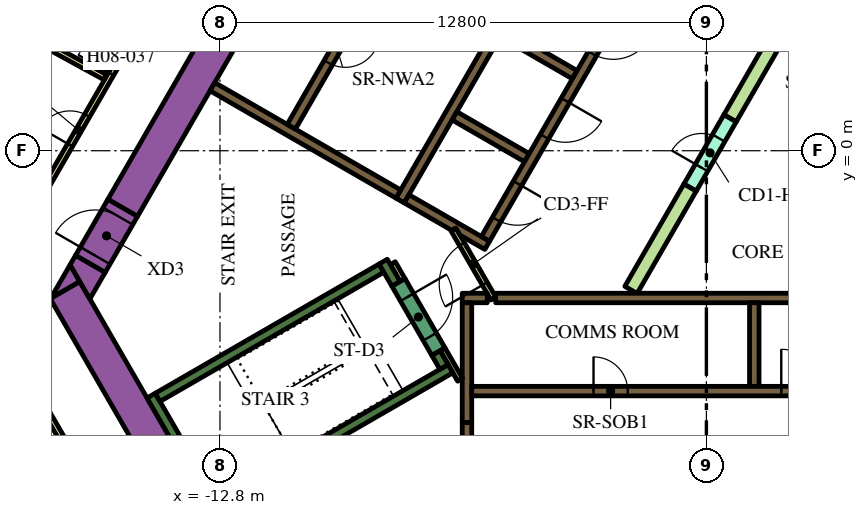
"""IFC4 building model, lengths in metres.
Left out: names, types, materials, properties, quantities, classifications, styles, units other than length and angle.
Written with IfcOpenShell. Run it as: python <this file> out.ifc"""

import sys

from ifc_helpers import new_model, si_unit, direction, frame, frame_2d, origin, place, context, subcontext, project, spatial, polyline, rectangle, outline, extrude, element, fill, save


model = new_model("IFC4")
c1 = context("Model", 3, precision=1e-05, world=origin(), true_north=direction((0.0, 1.0)))
c2 = subcontext(c1, "Body", "Model", "MODEL_VIEW")
j1 = project(units=[si_unit("LENGTHUNIT", "METRE"), si_unit("PLANEANGLEUNIT", "RADIAN")], contexts=[c1])
p1 = place(None, origin())
s1 = spatial("IfcSite", under=j1, at=p1, CompositionType="ELEMENT")
p2 = place(p1, origin())
s2 = spatial("IfcBuilding", under=s1, at=p2, CompositionType="ELEMENT")
p3 = place(p2, frame((0.0, 0.0, 111.0)))
s3 = spatial("IfcBuildingStorey", under=s2, at=p3, CompositionType="ELEMENT", Elevation=111.0)
p4 = place(p3, frame((-15.36, -1.503, 0.0), z_axis=(0.0, 0.0, 1.0), x_axis=(0.50000389221, 0.866023156604, 0.0)))
e1 = element("IfcWall", 1, at=p4, inside=s3, PredefinedType="SOLIDWALL", context=c2, shape_type="SweptSolid", body=[
    extrude(rectangle(XDim=21.0, YDim=0.9, at=frame_2d((10.5, 0.0))), origin(), (0.0, 0.0, 1.0), 3.9),
])
p5 = place(p3, frame((-12.134, -11.883, 0.0), z_axis=(0.0, 0.0, 1.0), x_axis=(-0.500005339912, 0.866022320763, 0.0)))
e2 = element("IfcWall", 2, at=p5, inside=s3, PredefinedType="SOLIDWALL", context=c2, shape_type="SweptSolid", body=[
    extrude(rectangle(XDim=9.488, YDim=0.9, at=frame_2d((4.744, 0.0))), origin(), (0.0, 0.0, 1.0), 3.9),
])
p6 = place(p3, origin())
e3 = element("IfcWall", 3, at=p6, inside=s3, PredefinedType="SOLIDWALL", context=c2, shape_type="SweptSolid", body=[
    extrude(outline(polyline([(-16.489, -3.44), (-17.251, -3.88), (-16.743, -3.0), (-16.489, -3.44)])), origin(), (0.0, 0.0, 1.0), 3.9),
])
e4 = element("IfcWall", 4, at=p6, inside=s3, PredefinedType="SOLIDWALL", context=c2, shape_type="SweptSolid", body=[
    extrude(outline(polyline([(-15.82, -3.201), (-16.223, -3.9), (-16.743, -3.0), (-16.599, -2.751), (-15.82, -3.201)])), origin(), (0.0, 0.0, 1.0), 3.9),
])
p7 = place(p3, frame((-12.885, -9.431, 0.0), z_axis=(0.0, 0.0, 1.0), x_axis=(-0.500020560727, 0.866013532718, 0.0)))
e5 = element("IfcWall", 5, at=p7, inside=s3, PredefinedType="SOLIDWALL", context=c2, shape_type="SweptSolid", body=[
    extrude(rectangle(XDim=3.45, YDim=0.25, at=frame_2d((1.725, 0.0))), origin(), (0.0, 0.0, 1.0), 3.9),
])
p8 = place(p3, frame((-14.44, -6.49, 0.0), z_axis=(0.0, 0.0, 1.0), x_axis=(0.866022966069, 0.500004222222, 0.0)))
e6 = element("IfcWall", 6, at=p8, inside=s3, PredefinedType="SOLIDWALL", context=c2, shape_type="SweptSolid", body=[
    extrude(rectangle(XDim=6.8, YDim=0.25, at=frame_2d((3.4, 0.0))), origin(), (0.0, 0.0, 1.0), 3.9),
])
p9 = place(p3, frame((-8.168, -3.503, 0.0), z_axis=(0.0, 0.0, 1.0), x_axis=(-0.499952099219, 0.866053057547, 0.0)))
e7 = element("IfcWall", 7, at=p9, inside=s3, PredefinedType="SOLIDWALL", context=c2, shape_type="SweptSolid", body=[
    extrude(rectangle(XDim=0.675, YDim=0.25, at=frame_2d((0.337, 0.0))), origin(), (0.0, 0.0, 1.0), 3.9),
])
p10 = place(p3, frame((-12.84, -9.261, 0.0), z_axis=(0.0, 0.0, 1.0), x_axis=(0.866016039709, 0.500016218704, 0.0)))
e8 = element("IfcWall", 8, at=p10, inside=s3, PredefinedType="SOLIDWALL", context=c2, shape_type="SweptSolid", body=[
    extrude(rectangle(XDim=7.05, YDim=0.25, at=frame_2d((3.525, 0.0))), origin(), (0.0, 0.0, 1.0), 3.9),
])
p11 = place(p3, frame((-6.905, -5.69, 0.0), z_axis=(0.0, 0.0, 1.0), x_axis=(-0.500402024738, 0.865793170242, 0.0)))
e9 = element("IfcWall", 9, at=p11, inside=s3, PredefinedType="SOLIDWALL", context=c2, shape_type="SweptSolid", body=[
    extrude(rectangle(XDim=0.425, YDim=0.25, at=frame_2d((0.212, 0.0))), origin(), (0.0, 0.0, 1.0), 3.9),
])
p12 = place(p3, frame((-5.545, -3.875, 0.0), z_axis=(0.0, 0.0, 1.0), x_axis=(1.0, 0.0, 0.0)))
e10 = element("IfcWall", 10, at=p12, inside=s3, PredefinedType="SOLIDWALL", context=c2, shape_type="SweptSolid", body=[
    extrude(rectangle(XDim=11.97, YDim=0.25, at=frame_2d((5.985, 0.0))), origin(), (0.0, 0.0, 1.0), 3.9),
])
p13 = place(p3, frame((-6.425, -3.875, 0.0), z_axis=(0.0, 0.0, 1.0), x_axis=(1.0, 0.0, 0.0)))
e11 = element("IfcWall", 11, at=p13, inside=s3, PredefinedType="SOLIDWALL", context=c2, shape_type="SweptSolid", body=[
    extrude(rectangle(XDim=0.658, YDim=0.25, at=frame_2d((0.329, 0.0))), origin(), (0.0, 0.0, 1.0), 3.9),
])
p14 = place(p3, frame((1.26, -4.0, 0.0), z_axis=(0.0, 0.0, 1.0), x_axis=(0.0, -1.0, 0.0)))
e12 = element("IfcWall", 12, at=p14, inside=s3, PredefinedType="SOLIDWALL", context=c2, shape_type="SweptSolid", body=[
    extrude(rectangle(XDim=2.2, YDim=0.25, at=frame_2d((1.1, 0.0))), origin(), (0.0, 0.0, 1.0), 3.9),
])
p15 = place(p3, frame((-6.3, -4.0, 0.0), z_axis=(0.0, 0.0, 1.0), x_axis=(0.0, -1.0, 0.0)))
e13 = element("IfcWall", 13, at=p15, inside=s3, PredefinedType="SOLIDWALL", context=c2, shape_type="SweptSolid", body=[
    extrude(rectangle(XDim=3.154, YDim=0.25, at=frame_2d((1.577, 0.0))), origin(), (0.0, 0.0, 1.0), 3.9),
])
e14 = element("IfcWall", 14, at=p6, inside=s3, PredefinedType="SOLIDWALL", context=c2, shape_type="SweptSolid", body=[
    extrude(outline(polyline([(0.566, 6.725), (0.566, 6.875), (0.566, 6.875), (0.565, 6.875), (0.361, 6.875), (0.035, 7.439), (0.252, 7.564), (0.377, 7.348), (6.552, -3.348), (6.677, -3.564), (6.46, -3.689), (0.448, 6.725), (0.565, 6.725), (0.566, 6.725), (0.566, 6.725)])), origin(), (0.0, 0.0, 1.0), 3.9),
])
p16 = place(p3, frame((-8.06, -1.311, 0.0), z_axis=(0.0, 0.0, 1.0), x_axis=(0.50000273126, 0.866023826885, 0.0)))
e15 = element("IfcWall", 15, at=p16, inside=s3, PredefinedType="SOLIDWALL", context=c2, shape_type="SweptSolid", body=[
    extrude(rectangle(XDim=10.33, YDim=0.25, at=frame_2d((5.165, 0.0))), origin(), (0.0, 0.0, 1.0), 3.9),
])
for number, where, z_axis, x_axis in (
    (16, (-5.369, 3.1, 0.0), (0.0, 0.0, 1.0), (0.866, -0.5, 0.0)),
    (17, (-4.724, -0.182, 0.0), (0.0, 0.0, 1.0), (-0.866, 0.5, 0.0)),
):
    element("IfcWall", number, at=place(p3, frame(where, z_axis=z_axis, x_axis=x_axis)), inside=s3, PredefinedType="SOLIDWALL", context=c2, shape_type="SweptSolid", body=[
        extrude(rectangle(XDim=2.2, YDim=0.25, at=frame_2d((1.1, 0.0))), origin(), (0.0, 0.0, 1.0), 3.9),
    ])
e18 = element("IfcWall", 18, at=p6, inside=s3, PredefinedType="SOLIDWALL", context=c2, shape_type="SweptSolid", body=[
    extrude(outline(polyline([(-5.922, -2.257), (-5.922, -2.257), (-5.705, -2.382), (-5.83, -2.598), (-6.483, -2.221), (-6.591, -2.033), (-6.591, -2.033), (-6.7, -2.096), (-7.952, -1.373), (-7.827, -1.156), (-5.922, -2.257)])), origin(), (0.0, 0.0, 1.0), 3.9),
])
p17 = place(p3, frame((-8.106, -1.14, 0.0), z_axis=(0.0, 0.0, 1.0), x_axis=(-0.866000643155, 0.500042884217, 0.0)))
e19 = element("IfcWall", 19, at=p17, inside=s3, PredefinedType="SOLIDWALL", context=c2, shape_type="SweptSolid", body=[
    extrude(rectangle(XDim=5.65, YDim=0.25, at=frame_2d((2.825, 0.0))), origin(), (0.0, 0.0, 1.0), 3.9),
])
p18 = place(p3, frame((-6.48, -6.027, 0.0), z_axis=(0.0, 0.0, 1.0), x_axis=(-0.499927229454, 0.866067413802, 0.0)))
e20 = element("IfcWall", 20, at=p18, inside=s3, PredefinedType="PARTITIONING", context=c2, shape_type="SweptSolid", body=[
    extrude(rectangle(XDim=0.929, YDim=0.15, at=frame_2d((0.464, 0.0))), origin(), (0.0, 0.0, 1.0), 3.9),
])
p19 = place(p3, frame((-8.252, -2.958, 0.0), z_axis=(0.0, 0.0, 1.0), x_axis=(0.500174715838, -0.865924508047, 0.0)))
e21 = element("IfcWall", 21, at=p19, inside=s3, PredefinedType="PARTITIONING", context=c2, shape_type="SweptSolid", body=[
    extrude(rectangle(XDim=0.514, YDim=0.15, at=frame_2d((0.257, 0.0))), origin(), (0.0, 0.0, 1.0), 2.75),
])
e22 = element("IfcWall", 22, at=p6, inside=s3, PredefinedType="PARTITIONING", context=c2, shape_type="SweptSolid", body=[
    extrude(outline(polyline([(-0.59, -0.872), (-0.265, -1.059), (-1.822, -3.756), (-2.147, -3.568), (-0.59, -0.872)])), origin(), (0.0, 0.0, 1.0), 2.75),
])
e23 = element("IfcWall", 23, at=p6, inside=s3, PredefinedType="PARTITIONING", context=c2, shape_type="SweptSolid", body=[
    extrude(outline(polyline([(2.017, 3.643), (2.342, 3.456), (0.785, 0.76), (0.46, 0.947), (2.017, 3.643)])), origin(), (0.0, 0.0, 1.0), 2.75),
])
p20 = place(p3, frame((-6.175, -6.325, 0.0), z_axis=(0.0, 0.0, 1.0), x_axis=(1.0, 0.0, 0.0)))
e24 = element("IfcWall", 24, at=p20, inside=s3, PredefinedType="SOLIDWALL", context=c2, shape_type="SweptSolid", body=[
    extrude(rectangle(XDim=12.35, YDim=0.25, at=frame_2d((6.175, 0.0))), origin(), (0.0, 0.0, 1.0), 3.9),
])
p21 = place(p20, frame((3.205, 0.0, 0.0)))
e25 = element("IfcOpeningElement", 25, at=p21, cuts=e24, PredefinedType="OPENING", context=c2, shape_type="SweptSolid", body=[
    extrude(rectangle(XDim=0.9, YDim=2.1, at=frame_2d((0.45, 1.05))), frame((0.0, 0.135, 0.0), z_axis=(0.0, -1.0, 0.0), x_axis=(1.0, 0.0, 0.0)), (0.0, 0.0, 1.0), 0.27),
])
p22 = place(p20, frame((8.145, 0.0, 0.0)))
e26 = element("IfcOpeningElement", 26, at=p22, cuts=e24, PredefinedType="OPENING", context=c2, shape_type="SweptSolid", body=[
    extrude(rectangle(XDim=1.1, YDim=2.1, at=frame_2d((0.55, 1.05))), frame((0.0, 0.135, 0.0), z_axis=(0.0, -1.0, 0.0), x_axis=(1.0, 0.0, 0.0)), (0.0, 0.0, 1.0), 0.27),
])
p23 = place(p20, frame((10.665, 0.0, 0.0)))
e27 = element("IfcOpeningElement", 27, at=p23, cuts=e24, PredefinedType="OPENING", context=c2, shape_type="SweptSolid", body=[
    extrude(rectangle(XDim=1.1, YDim=2.1, at=frame_2d((0.55, 1.05))), frame((0.0, 0.135, 0.0), z_axis=(0.0, -1.0, 0.0), x_axis=(1.0, 0.0, 0.0)), (0.0, 0.0, 1.0), 0.27),
])
p24 = place(p3, frame((-6.008, 9.144, 0.0), z_axis=(0.0, 0.0, 1.0), x_axis=(-0.500006956611, -0.866021387346, 0.0)))
e28 = element("IfcWall", 28, at=p24, inside=s3, PredefinedType="SOLIDWALL", context=c2, shape_type="SweptSolid", body=[
    extrude(rectangle(XDim=9.83, YDim=0.25, at=frame_2d((4.915, 0.0))), origin(), (0.0, 0.0, 1.0), 3.9),
])
p25 = place(p24, frame((6.985, 0.0, 0.0)))
e29 = element("IfcOpeningElement", 29, at=p25, cuts=e28, PredefinedType="OPENING", context=c2, shape_type="SweptSolid", body=[
    extrude(rectangle(XDim=0.9, YDim=2.1, at=frame_2d((0.45, 1.05))), frame((0.0, 0.135, 0.0), z_axis=(0.0, -1.0, 0.0), x_axis=(1.0, 0.0, 0.0)), (0.0, 0.0, 1.0), 0.27),
])
p26 = place(p3, frame((-0.898, 6.194, 0.0), z_axis=(0.0, 0.0, 1.0), x_axis=(-0.499996202215, -0.866027596426, 0.0)))
e30 = element("IfcWall", 30, at=p26, inside=s3, PredefinedType="SOLIDWALL", context=c2, shape_type="SweptSolid", body=[
    extrude(rectangle(XDim=9.83, YDim=0.25, at=frame_2d((4.915, 0.0))), origin(), (0.0, 0.0, 1.0), 3.9),
])
p27 = place(p26, frame((0.585, 0.0, 0.0)))
e31 = element("IfcOpeningElement", 31, at=p27, cuts=e30, PredefinedType="OPENING", context=c2, shape_type="SweptSolid", body=[
    extrude(rectangle(XDim=1.1, YDim=2.1, at=frame_2d((0.55, 1.05))), frame((0.0, 0.135, 0.0), z_axis=(0.0, -1.0, 0.0), x_axis=(1.0, 0.0, 0.0)), (0.0, 0.0, 1.0), 0.27),
])
p28 = place(p26, frame((3.105, 0.0, 0.0)))
e32 = element("IfcOpeningElement", 32, at=p28, cuts=e30, PredefinedType="OPENING", context=c2, shape_type="SweptSolid", body=[
    extrude(rectangle(XDim=1.1, YDim=2.1, at=frame_2d((0.55, 1.05))), frame((0.0, 0.135, 0.0), z_axis=(0.0, -1.0, 0.0), x_axis=(1.0, 0.0, 0.0)), (0.0, 0.0, 1.0), 0.27),
])
p29 = place(p26, frame((5.625, 0.0, 0.0)))
e33 = element("IfcOpeningElement", 33, at=p29, cuts=e30, PredefinedType="OPENING", context=c2, shape_type="SweptSolid", body=[
    extrude(rectangle(XDim=1.1, YDim=2.1, at=frame_2d((0.55, 1.05))), frame((0.0, 0.135, 0.0), z_axis=(0.0, -1.0, 0.0), x_axis=(1.0, 0.0, 0.0)), (0.0, 0.0, 1.0), 0.27),
])
p30 = place(p26, frame((8.145, 0.0, 0.0)))
e34 = element("IfcOpeningElement", 34, at=p30, cuts=e30, PredefinedType="OPENING", context=c2, shape_type="SweptSolid", body=[
    extrude(rectangle(XDim=1.1, YDim=2.1, at=frame_2d((0.55, 1.05))), frame((0.0, 0.135, 0.0), z_axis=(0.0, -1.0, 0.0), x_axis=(1.0, 0.0, 0.0)), (0.0, 0.0, 1.0), 0.27),
])
p31 = place(p3, frame((-8.103, -3.466, 0.0), z_axis=(0.0, 0.0, 1.0), x_axis=(0.500078061341, -0.865980330357, 0.0)))
e35 = element("IfcWall", 35, at=p31, inside=s3, PredefinedType="SOLIDWALL", context=c2, shape_type="SweptSolid", body=[
    extrude(rectangle(XDim=2.1, YDim=0.4, at=frame_2d((1.05, 0.0))), origin(), (0.0, 0.0, 1.0), 3.9),
])
p32 = place(p31, frame((0.45, 0.0, 0.0)))
e36 = element("IfcOpeningElement", 36, at=p32, cuts=e35, PredefinedType="OPENING", context=c2, shape_type="SweptSolid", body=[
    extrude(rectangle(XDim=1.2, YDim=2.1, at=frame_2d((0.6, 1.05))), frame((0.0, 0.21, 0.0), z_axis=(0.0, -1.0, 0.0), x_axis=(1.0, 0.0, 0.0)), (0.0, 0.0, 1.0), 0.42),
])
p33 = place(p3, frame((-6.3, -7.154, 0.0), z_axis=(0.0, 0.0, 1.0), x_axis=(0.0, -1.0, 0.0)))
e37 = element("IfcWall", 37, at=p33, inside=s3, PredefinedType="SOLIDWALL", context=c2, shape_type="SweptSolid", body=[
    extrude(rectangle(XDim=1.8, YDim=0.25, at=frame_2d((0.9, 0.0))), origin(), (0.0, 0.0, 1.0), 3.9),
])
p34 = place(p33, frame((0.45, 0.0, 0.0)))
e38 = element("IfcOpeningElement", 38, at=p34, cuts=e37, PredefinedType="OPENING", context=c2, shape_type="SweptSolid", body=[
    extrude(rectangle(XDim=0.9, YDim=2.1, at=frame_2d((0.45, 1.05))), frame((0.0, 0.135, 0.0), z_axis=(0.0, -1.0, 0.0), x_axis=(1.0, 0.0, 0.0)), (0.0, 0.0, 1.0), 0.27),
])
p35 = place(p3, frame((-0.427, -0.966, 0.0), z_axis=(0.0, 0.0, 1.0), x_axis=(0.49994051562, 0.866059744384, 0.0)))
e39 = element("IfcWall", 39, at=p35, inside=s3, PredefinedType="PARTITIONING", context=c2, shape_type="SweptSolid", body=[
    extrude(rectangle(XDim=2.1, YDim=0.375, at=frame_2d((1.05, 0.0))), origin(), (0.0, 0.0, 1.0), 2.75),
])
p36 = place(p35, frame((0.6, 0.0, 0.0)))
e40 = element("IfcOpeningElement", 40, at=p36, cuts=e39, PredefinedType="OPENING", context=c2, shape_type="SweptSolid", body=[
    extrude(rectangle(XDim=0.9, YDim=2.1, at=frame_2d((0.45, 1.05))), frame((0.0, 0.198, 0.0), z_axis=(0.0, -1.0, 0.0), x_axis=(1.0, 0.0, 0.0)), (0.0, 0.0, 1.0), 0.395),
])
p37 = place(p3, frame((-5.606, -3.89, 0.0), z_axis=(0.0, 0.0, 1.0), x_axis=(-0.500027713859, 0.866009402589, 0.0)))
e41 = element("IfcWall", 41, at=p37, inside=s3, PredefinedType="PARTITIONING", context=c2, shape_type="SweptSolid", body=[
    extrude(rectangle(XDim=2.1, YDim=0.15, at=frame_2d((1.05, 0.0))), origin(), (0.0, 0.0, 1.0), 2.75),
])
p38 = place(p37, frame((0.45, 0.0, 0.0)))
e42 = element("IfcOpeningElement", 42, at=p38, cuts=e41, PredefinedType="OPENING", context=c2, shape_type="SweptSolid", body=[
    extrude(rectangle(XDim=1.2, YDim=2.1, at=frame_2d((0.6, 1.05))), frame((0.0, 0.085, 0.0), z_axis=(0.0, -1.0, 0.0), x_axis=(1.0, 0.0, 0.0)), (0.0, 0.0, 1.0), 0.17),
])
p39 = place(p3, frame((-16.209, -2.976, 0.0), z_axis=(0.0, 0.0, 1.0), x_axis=(0.499954529098, 0.86605165483, 0.0)))
e43 = element("IfcWall", 43, at=p39, inside=s3, PredefinedType="SOLIDWALL", context=c2, shape_type="SweptSolid", body=[
    extrude(rectangle(XDim=1.7, YDim=0.9, at=frame_2d((0.85, 0.0))), origin(), (0.0, 0.0, 1.0), 3.9),
])
p40 = place(p39, frame((0.25, 0.0, 0.0)))
e44 = element("IfcOpeningElement", 44, at=p40, cuts=e43, PredefinedType="OPENING", context=c2, shape_type="SweptSolid", body=[
    extrude(rectangle(XDim=1.2, YDim=2.1, at=frame_2d((0.6, 1.05))), frame((0.0, 0.46, 0.0), z_axis=(0.0, -1.0, 0.0), x_axis=(1.0, 0.0, 0.0)), (0.0, 0.0, 1.0), 0.92),
])
p41 = place(p3, frame((-19.081, -3.9, 0.0), z_axis=(0.0, 0.0, 1.0), x_axis=(0.499998313975, 0.866026377209, 0.0)))
e45 = element("IfcWall", 45, at=p41, inside=s3, PredefinedType="PARTITIONING", context=c2, shape_type="SweptSolid", body=[
    extrude(rectangle(XDim=25.766, YDim=0.15, at=frame_2d((12.883, 0.0))), origin(), (0.0, 0.0, 1.0), 2.75),
])
p42 = place(p41, frame((19.306, 0.0, 0.0)))
e46 = element("IfcOpeningElement", 46, at=p42, cuts=e45, PredefinedType="OPENING", context=c2, shape_type="SweptSolid", body=[
    extrude(rectangle(XDim=1.0, YDim=2.1, at=frame_2d((0.5, 1.05))), frame((0.0, 0.085, 0.0), z_axis=(0.0, -1.0, 0.0), x_axis=(1.0, 0.0, 0.0)), (0.0, 0.0, 1.0), 0.17),
])
p43 = place(p41, frame((18.0, 0.0, 0.0)))
e47 = element("IfcOpeningElement", 47, at=p43, cuts=e45, PredefinedType="OPENING", context=c2, shape_type="SweptSolid", body=[
    extrude(rectangle(XDim=1.0, YDim=2.1, at=frame_2d((0.5, 1.05))), frame((0.0, 0.085, 0.0), z_axis=(0.0, -1.0, 0.0), x_axis=(1.0, 0.0, 0.0)), (0.0, 0.0, 1.0), 0.17),
])
p44 = place(p41, frame((6.838, 0.0, 0.0)))
e48 = element("IfcOpeningElement", 48, at=p44, cuts=e45, PredefinedType="OPENING", context=c2, shape_type="SweptSolid", body=[
    extrude(rectangle(XDim=1.0, YDim=2.1, at=frame_2d((0.5, 1.05))), frame((0.0, 0.085, 0.0), z_axis=(0.0, -1.0, 0.0), x_axis=(1.0, 0.0, 0.0)), (0.0, 0.0, 1.0), 0.17),
])
p45 = place(p41, frame((4.674, 0.0, 0.0)))
e49 = element("IfcOpeningElement", 49, at=p45, cuts=e45, PredefinedType="OPENING", context=c2, shape_type="SweptSolid", body=[
    extrude(rectangle(XDim=0.9, YDim=2.1, at=frame_2d((0.45, 1.05))), frame((0.0, 0.085, 0.0), z_axis=(0.0, -1.0, 0.0), x_axis=(1.0, 0.0, 0.0)), (0.0, 0.0, 1.0), 0.17),
])
p46 = place(p41, frame((0.18, 0.0, 0.0)))
e50 = element("IfcOpeningElement", 50, at=p46, cuts=e45, PredefinedType="OPENING", context=c2, shape_type="SweptSolid", body=[
    extrude(rectangle(XDim=1.0, YDim=2.1, at=frame_2d((0.5, 1.05))), frame((0.0, 0.085, 0.0), z_axis=(0.0, -1.0, 0.0), x_axis=(1.0, 0.0, 0.0)), (0.0, 0.0, 1.0), 0.17),
])
p47 = place(p3, frame((-16.412, -8.523, 0.0), z_axis=(0.0, 0.0, 1.0), x_axis=(-0.500001929737, 0.866024289647, 0.0)))
e51 = element("IfcWall", 51, at=p47, inside=s3, PredefinedType="PARTITIONING", context=c2, shape_type="SweptSolid", body=[
    extrude(rectangle(XDim=5.268, YDim=0.15, at=frame_2d((2.634, 0.0))), origin(), (0.0, 0.0, 1.0), 2.75),
])
p48 = place(p3, frame((-26.591, -3.122, 0.0), z_axis=(0.0, 0.0, 1.0), x_axis=(0.893766213273, -0.448533115847, 0.0)))
e52 = element("IfcWall", 52, at=p48, inside=s3, PredefinedType="PARTITIONING", context=c2, shape_type="SweptSolid", body=[
    extrude(rectangle(XDim=10.875, YDim=0.15, at=frame_2d((5.438, 0.0))), origin(), (0.0, 0.0, 1.0), 2.75),
])
p49 = place(p3, frame((-21.614, 5.102, 0.0), z_axis=(0.0, 0.0, 1.0), x_axis=(0.877484555087, -0.479604895287, 0.0)))
e53 = element("IfcWall", 53, at=p49, inside=s3, PredefinedType="PARTITIONING", context=c2, shape_type="SweptSolid", body=[
    extrude(rectangle(XDim=6.611, YDim=0.15, at=frame_2d((3.306, 0.0))), origin(), (0.0, 0.0, 1.0), 2.75),
])
p50 = place(p21, origin())
e54 = element("IfcDoor", 54, at=p50, inside=s3, OperationType="SINGLE_SWING_LEFT", PredefinedType="DOOR", context=c2, shape_type="SweptSolid", body=[
    extrude(rectangle(XDim=0.9, YDim=2.1, at=frame_2d((0.45, 1.05))), frame((0.0, 0.025, 0.0), z_axis=(0.0, -1.0, 0.0), x_axis=(1.0, 0.0, 0.0)), (0.0, 0.0, 1.0), 0.05),
])
fill(e25, e54)
p51 = place(p22, origin())
e55 = element("IfcDoor", 55, at=p51, inside=s3, OperationType="DOUBLE_DOOR_SLIDING", PredefinedType="DOOR", context=c2, shape_type="SweptSolid", body=[
    extrude(rectangle(XDim=1.1, YDim=2.1, at=frame_2d((0.55, 1.05))), frame((0.0, 0.025, 0.0), z_axis=(0.0, -1.0, 0.0), x_axis=(1.0, 0.0, 0.0)), (0.0, 0.0, 1.0), 0.05),
])
fill(e26, e55)
p52 = place(p25, origin())
e56 = element("IfcDoor", 56, at=p52, inside=s3, OperationType="SINGLE_SWING_LEFT", PredefinedType="DOOR", context=c2, shape_type="SweptSolid", body=[
    extrude(rectangle(XDim=0.9, YDim=2.1, at=frame_2d((0.45, 1.05))), frame((0.0, 0.025, 0.0), z_axis=(0.0, -1.0, 0.0), x_axis=(1.0, 0.0, 0.0)), (0.0, 0.0, 1.0), 0.05),
])
fill(e29, e56)
p53 = place(p28, origin())
e57 = element("IfcDoor", 57, at=p53, inside=s3, OperationType="DOUBLE_DOOR_SLIDING", PredefinedType="DOOR", context=c2, shape_type="SweptSolid", body=[
    extrude(rectangle(XDim=1.1, YDim=2.1, at=frame_2d((0.55, 1.05))), frame((0.0, 0.025, 0.0), z_axis=(0.0, -1.0, 0.0), x_axis=(1.0, 0.0, 0.0)), (0.0, 0.0, 1.0), 0.05),
])
fill(e32, e57)
p54 = place(p29, origin())
e58 = element("IfcDoor", 58, at=p54, inside=s3, OperationType="DOUBLE_DOOR_SLIDING", PredefinedType="DOOR", context=c2, shape_type="SweptSolid", body=[
    extrude(rectangle(XDim=1.1, YDim=2.1, at=frame_2d((0.55, 1.05))), frame((0.0, 0.025, 0.0), z_axis=(0.0, -1.0, 0.0), x_axis=(1.0, 0.0, 0.0)), (0.0, 0.0, 1.0), 0.05),
])
fill(e33, e58)
p55 = place(p30, origin())
e59 = element("IfcDoor", 59, at=p55, inside=s3, OperationType="DOUBLE_DOOR_SLIDING", PredefinedType="DOOR", context=c2, shape_type="SweptSolid", body=[
    extrude(rectangle(XDim=1.1, YDim=2.1, at=frame_2d((0.55, 1.05))), frame((0.0, 0.025, 0.0), z_axis=(0.0, -1.0, 0.0), x_axis=(1.0, 0.0, 0.0)), (0.0, 0.0, 1.0), 0.05),
])
fill(e34, e59)
p56 = place(p32, origin())
e60 = element("IfcDoor", 60, at=p56, inside=s3, OperationType="SINGLE_SWING_LEFT", PredefinedType="DOOR", context=c2, shape_type="SweptSolid", body=[
    extrude(rectangle(XDim=1.2, YDim=2.1, at=frame_2d((0.6, 1.05))), frame((0.0, 0.025, 0.0), z_axis=(0.0, -1.0, 0.0), x_axis=(1.0, 0.0, 0.0)), (0.0, 0.0, 1.0), 0.05),
])
fill(e36, e60)
p57 = place(p36, origin())
e61 = element("IfcDoor", 61, at=p57, inside=s3, OperationType="SINGLE_SWING_LEFT", PredefinedType="DOOR", context=c2, shape_type="SweptSolid", body=[
    extrude(rectangle(XDim=0.9, YDim=2.1, at=frame_2d((0.45, 1.05))), frame((0.0, 0.025, 0.0), z_axis=(0.0, -1.0, 0.0), x_axis=(1.0, 0.0, 0.0)), (0.0, 0.0, 1.0), 0.05),
])
fill(e40, e61)
p58 = place(p38, origin())
e62 = element("IfcDoor", 62, at=p58, inside=s3, OperationType="SINGLE_SWING_LEFT", PredefinedType="DOOR", context=c2, shape_type="SweptSolid", body=[
    extrude(rectangle(XDim=1.2, YDim=2.1, at=frame_2d((0.6, 1.05))), frame((0.0, 0.025, 0.0), z_axis=(0.0, -1.0, 0.0), x_axis=(1.0, 0.0, 0.0)), (0.0, 0.0, 1.0), 0.05),
])
fill(e42, e62)
p59 = place(p40, origin())
e63 = element("IfcDoor", 63, at=p59, inside=s3, OperationType="SINGLE_SWING_LEFT", PredefinedType="DOOR", context=c2, shape_type="SweptSolid", body=[
    extrude(rectangle(XDim=1.2, YDim=2.1, at=frame_2d((0.6, 1.05))), frame((0.0, 0.025, 0.0), z_axis=(0.0, -1.0, 0.0), x_axis=(1.0, 0.0, 0.0)), (0.0, 0.0, 1.0), 0.05),
])
fill(e44, e63)
p60 = place(p44, origin())
e64 = element("IfcDoor", 64, at=p60, inside=s3, OperationType="SINGLE_SWING_LEFT", PredefinedType="DOOR", context=c2, shape_type="SweptSolid", body=[
    extrude(rectangle(XDim=1.0, YDim=2.1, at=frame_2d((0.5, 1.05))), frame((0.0, 0.025, 0.0), z_axis=(0.0, -1.0, 0.0), x_axis=(1.0, 0.0, 0.0)), (0.0, 0.0, 1.0), 0.05),
])
fill(e48, e64)
p61 = place(p45, origin())
e65 = element("IfcDoor", 65, at=p61, inside=s3, OperationType="SINGLE_SWING_RIGHT", PredefinedType="DOOR", context=c2, shape_type="SweptSolid", body=[
    extrude(rectangle(XDim=0.9, YDim=2.1, at=frame_2d((0.45, 1.05))), frame((0.0, 0.025, 0.0), z_axis=(0.0, -1.0, 0.0), x_axis=(1.0, 0.0, 0.0)), (0.0, 0.0, 1.0), 0.05),
])
fill(e49, e65)
save(model, sys.argv[1])
